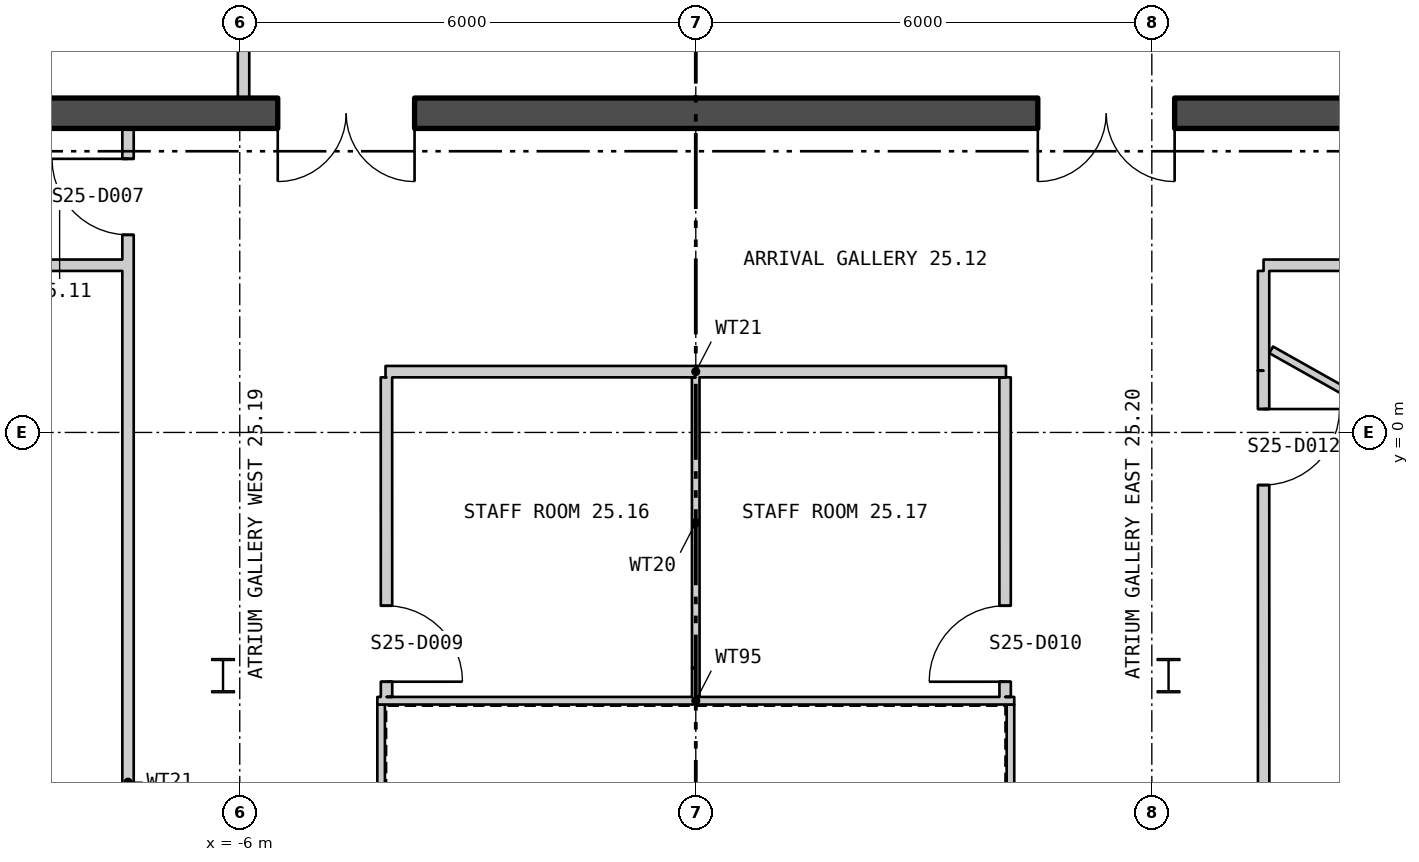
"""IFC4 building model, lengths in metres.
Left out: names, types, materials, properties, quantities, classifications, styles, units other than length and angle.
Written with IfcOpenShell. Run it as: python <this file> out.ifc"""

import sys

from ifc_helpers import new_model, si_unit, direction, frame, frame_2d, origin, origin_2d, place, context, subcontext, project, spatial, polyline, rectangle, i_section, outline, extrude, element, fill, save


model = new_model("IFC4")
c1 = context("Model", 3, precision=1e-05, world=origin(), true_north=direction((0.0, 1.0)))
c2 = subcontext(c1, "Body", "Model", "MODEL_VIEW")
j1 = project(units=[si_unit("LENGTHUNIT", "METRE"), si_unit("PLANEANGLEUNIT", "RADIAN")], contexts=[c1])
p1 = place(None, origin())
s1 = spatial("IfcSite", under=j1, at=p1, CompositionType="ELEMENT")
p2 = place(p1, origin())
s2 = spatial("IfcBuilding", under=s1, at=p2, CompositionType="ELEMENT")
p3 = place(p2, frame((0.0, 0.0, 321.0)))
s3 = spatial("IfcBuildingStorey", under=s2, at=p3, CompositionType="ELEMENT", Elevation=321.0)
for number, where, z_axis, x_axis in (
    (1, (6.22, -3.2, 0.0), (0.0, 0.0, 1.0), (1.0, 0.0, 0.0)),
    (2, (-6.22, -3.2, 0.0), (0.0, 0.0, 1.0), (1.0, 0.0, 0.0)),
):
    element("IfcColumn", number, at=place(p3, frame(where, z_axis=z_axis, x_axis=x_axis)), inside=s3, PredefinedType="COLUMN", context=c2, shape_type="SweptSolid", body=[
        extrude(i_section(OverallWidth=0.3, OverallDepth=0.45, WebThickness=0.014, FlangeThickness=0.026, at=origin_2d()), origin(), (0.0, 0.0, 1.0), 4.2),
    ])
p4 = place(p3, frame((-24.875, 16.493, -0.18), z_axis=(0.0, 0.0, 1.0), x_axis=(0.500000141277, -0.866025322218, 0.0)))
e3 = element("IfcWall", 3, at=p4, inside=s3, PredefinedType="SOLIDWALL", context=c2, shape_type="SweptSolid", body=[
    extrude(outline(polyline([(-0.13, -0.225), (45.86, -0.225), (45.6, 0.225), (0.13, 0.225), (-0.13, -0.225)])), origin(), (0.0, 0.0, 1.0), 3.98),
])
p5 = place(p4, frame((1.424, 0.0, 1.08)))
e4 = element("IfcOpeningElement", 4, at=p5, cuts=e3, PredefinedType="OPENING", context=c2, shape_type="SweptSolid", body=[
    extrude(rectangle(XDim=2.4, YDim=2.3, at=frame_2d((1.2, 1.15))), frame((0.0, 0.235, 0.0), z_axis=(0.0, -1.0, 0.0), x_axis=(1.0, 0.0, 0.0)), (0.0, 0.0, 1.0), 0.47),
])
p6 = place(p4, frame((5.892, 0.0, 1.08)))
e5 = element("IfcOpeningElement", 5, at=p6, cuts=e3, PredefinedType="OPENING", context=c2, shape_type="SweptSolid", body=[
    extrude(rectangle(XDim=2.4, YDim=2.3, at=frame_2d((1.2, 1.15))), frame((0.0, 0.235, 0.0), z_axis=(0.0, -1.0, 0.0), x_axis=(1.0, 0.0, 0.0)), (0.0, 0.0, 1.0), 0.47),
])
p7 = place(p4, frame((10.399, 0.0, 1.08)))
e6 = element("IfcOpeningElement", 6, at=p7, cuts=e3, PredefinedType="OPENING", context=c2, shape_type="SweptSolid", body=[
    extrude(rectangle(XDim=2.4, YDim=2.3, at=frame_2d((1.2, 1.15))), frame((0.0, 0.235, 0.0), z_axis=(0.0, -1.0, 0.0), x_axis=(1.0, 0.0, 0.0)), (0.0, 0.0, 1.0), 0.47),
])
p8 = place(p4, frame((14.905, 0.0, 1.08)))
e7 = element("IfcOpeningElement", 7, at=p8, cuts=e3, PredefinedType="OPENING", context=c2, shape_type="SweptSolid", body=[
    extrude(rectangle(XDim=2.4, YDim=2.3, at=frame_2d((1.2, 1.15))), frame((0.0, 0.235, 0.0), z_axis=(0.0, -1.0, 0.0), x_axis=(1.0, 0.0, 0.0)), (0.0, 0.0, 1.0), 0.47),
])
p9 = place(p4, frame((19.412, 0.0, 1.08)))
e8 = element("IfcOpeningElement", 8, at=p9, cuts=e3, PredefinedType="OPENING", context=c2, shape_type="SweptSolid", body=[
    extrude(rectangle(XDim=2.4, YDim=2.3, at=frame_2d((1.2, 1.15))), frame((0.0, 0.235, 0.0), z_axis=(0.0, -1.0, 0.0), x_axis=(1.0, 0.0, 0.0)), (0.0, 0.0, 1.0), 0.47),
])
p10 = place(p4, frame((23.918, 0.0, 1.08)))
e9 = element("IfcOpeningElement", 9, at=p10, cuts=e3, PredefinedType="OPENING", context=c2, shape_type="SweptSolid", body=[
    extrude(rectangle(XDim=2.4, YDim=2.3, at=frame_2d((1.2, 1.15))), frame((0.0, 0.235, 0.0), z_axis=(0.0, -1.0, 0.0), x_axis=(1.0, 0.0, 0.0)), (0.0, 0.0, 1.0), 0.47),
])
p11 = place(p4, frame((28.425, 0.0, 1.08)))
e10 = element("IfcOpeningElement", 10, at=p11, cuts=e3, PredefinedType="OPENING", context=c2, shape_type="SweptSolid", body=[
    extrude(rectangle(XDim=2.4, YDim=2.3, at=frame_2d((1.2, 1.15))), frame((0.0, 0.235, 0.0), z_axis=(0.0, -1.0, 0.0), x_axis=(1.0, 0.0, 0.0)), (0.0, 0.0, 1.0), 0.47),
])
p12 = place(p4, frame((37.438, 0.0, 1.08)))
e11 = element("IfcOpeningElement", 11, at=p12, cuts=e3, PredefinedType="OPENING", context=c2, shape_type="SweptSolid", body=[
    extrude(rectangle(XDim=2.4, YDim=2.3, at=frame_2d((1.2, 1.15))), frame((0.0, 0.235, 0.0), z_axis=(0.0, -1.0, 0.0), x_axis=(1.0, 0.0, 0.0)), (0.0, 0.0, 1.0), 0.47),
])
p13 = place(p4, frame((41.907, 0.0, 1.08)))
e12 = element("IfcOpeningElement", 12, at=p13, cuts=e3, PredefinedType="OPENING", context=c2, shape_type="SweptSolid", body=[
    extrude(rectangle(XDim=2.4, YDim=2.3, at=frame_2d((1.2, 1.15))), frame((0.0, 0.235, 0.0), z_axis=(0.0, -1.0, 0.0), x_axis=(1.0, 0.0, 0.0)), (0.0, 0.0, 1.0), 0.47),
])
p14 = place(p3, frame((2.01, -23.11, -0.18), z_axis=(0.0, 0.0, 1.0), x_axis=(0.500000141277, 0.866025322218, 0.0)))
e13 = element("IfcWall", 13, at=p14, inside=s3, PredefinedType="SOLIDWALL", context=c2, shape_type="SweptSolid", body=[
    extrude(outline(polyline([(-0.13, -0.225), (45.86, -0.225), (45.6, 0.225), (0.13, 0.225), (-0.13, -0.225)])), origin(), (0.0, 0.0, 1.0), 3.98),
])
p15 = place(p14, frame((1.424, 0.0, 1.08)))
e14 = element("IfcOpeningElement", 14, at=p15, cuts=e13, PredefinedType="OPENING", context=c2, shape_type="SweptSolid", body=[
    extrude(rectangle(XDim=2.4, YDim=2.3, at=frame_2d((1.2, 1.15))), frame((0.0, 0.235, 0.0), z_axis=(0.0, -1.0, 0.0), x_axis=(1.0, 0.0, 0.0)), (0.0, 0.0, 1.0), 0.47),
])
p16 = place(p14, frame((5.892, 0.0, 1.08)))
e15 = element("IfcOpeningElement", 15, at=p16, cuts=e13, PredefinedType="OPENING", context=c2, shape_type="SweptSolid", body=[
    extrude(rectangle(XDim=2.4, YDim=2.3, at=frame_2d((1.2, 1.15))), frame((0.0, 0.235, 0.0), z_axis=(0.0, -1.0, 0.0), x_axis=(1.0, 0.0, 0.0)), (0.0, 0.0, 1.0), 0.47),
])
p17 = place(p14, frame((14.905, 0.0, 1.08)))
e16 = element("IfcOpeningElement", 16, at=p17, cuts=e13, PredefinedType="OPENING", context=c2, shape_type="SweptSolid", body=[
    extrude(rectangle(XDim=2.4, YDim=2.3, at=frame_2d((1.2, 1.15))), frame((0.0, 0.235, 0.0), z_axis=(0.0, -1.0, 0.0), x_axis=(1.0, 0.0, 0.0)), (0.0, 0.0, 1.0), 0.47),
])
p18 = place(p14, frame((19.412, 0.0, 1.08)))
e17 = element("IfcOpeningElement", 17, at=p18, cuts=e13, PredefinedType="OPENING", context=c2, shape_type="SweptSolid", body=[
    extrude(rectangle(XDim=2.4, YDim=2.3, at=frame_2d((1.2, 1.15))), frame((0.0, 0.235, 0.0), z_axis=(0.0, -1.0, 0.0), x_axis=(1.0, 0.0, 0.0)), (0.0, 0.0, 1.0), 0.47),
])
p19 = place(p14, frame((23.918, 0.0, 1.08)))
e18 = element("IfcOpeningElement", 18, at=p19, cuts=e13, PredefinedType="OPENING", context=c2, shape_type="SweptSolid", body=[
    extrude(rectangle(XDim=2.4, YDim=2.3, at=frame_2d((1.2, 1.15))), frame((0.0, 0.235, 0.0), z_axis=(0.0, -1.0, 0.0), x_axis=(1.0, 0.0, 0.0)), (0.0, 0.0, 1.0), 0.47),
])
p20 = place(p14, frame((28.425, 0.0, 1.08)))
e19 = element("IfcOpeningElement", 19, at=p20, cuts=e13, PredefinedType="OPENING", context=c2, shape_type="SweptSolid", body=[
    extrude(rectangle(XDim=2.4, YDim=2.3, at=frame_2d((1.2, 1.15))), frame((0.0, 0.235, 0.0), z_axis=(0.0, -1.0, 0.0), x_axis=(1.0, 0.0, 0.0)), (0.0, 0.0, 1.0), 0.47),
])
p21 = place(p14, frame((37.438, 0.0, 1.08)))
e20 = element("IfcOpeningElement", 20, at=p21, cuts=e13, PredefinedType="OPENING", context=c2, shape_type="SweptSolid", body=[
    extrude(rectangle(XDim=2.4, YDim=2.3, at=frame_2d((1.2, 1.15))), frame((0.0, 0.235, 0.0), z_axis=(0.0, -1.0, 0.0), x_axis=(1.0, 0.0, 0.0)), (0.0, 0.0, 1.0), 0.47),
])
p22 = place(p14, frame((41.907, 0.0, 1.08)))
e21 = element("IfcOpeningElement", 21, at=p22, cuts=e13, PredefinedType="OPENING", context=c2, shape_type="SweptSolid", body=[
    extrude(rectangle(XDim=2.4, YDim=2.3, at=frame_2d((1.2, 1.15))), frame((0.0, 0.235, 0.0), z_axis=(0.0, -1.0, 0.0), x_axis=(1.0, 0.0, 0.0)), (0.0, 0.0, 1.0), 0.47),
])
p23 = place(p3, frame((4.14, -11.62, 0.0), z_axis=(0.0, 0.0, 1.0), x_axis=(0.0, 1.0, 0.0)))
e22 = element("IfcWall", 22, at=p23, inside=s3, PredefinedType="PARTITIONING", context=c2, shape_type="SweptSolid", body=[
    extrude(rectangle(XDim=8.04, YDim=0.1, at=frame_2d((4.02, 0.0))), origin(), (0.0, 0.0, 1.0), 4.0),
])
p24 = place(p3, frame((4.19, -3.53, 0.0), z_axis=(0.0, 0.0, 1.0), x_axis=(-1.0, 0.0, 0.0)))
e23 = element("IfcWall", 23, at=p24, inside=s3, PredefinedType="PARTITIONING", context=c2, shape_type="SweptSolid", body=[
    extrude(rectangle(XDim=8.38, YDim=0.1, at=frame_2d((4.19, 0.0))), origin(), (0.0, 0.0, 1.0), 4.0),
])
p25 = place(p3, frame((-4.14, -3.58, 0.0), z_axis=(0.0, 0.0, 1.0), x_axis=(0.0, -1.0, 0.0)))
e24 = element("IfcWall", 24, at=p25, inside=s3, PredefinedType="PARTITIONING", context=c2, shape_type="SweptSolid", body=[
    extrude(rectangle(XDim=8.04, YDim=0.1, at=frame_2d((4.02, 0.0))), origin(), (0.0, 0.0, 1.0), 4.0),
])
p26 = place(p3, frame((-14.5, 4.2, 0.0), z_axis=(0.0, 0.0, 1.0), x_axis=(1.0, 0.0, 0.0)))
e25 = element("IfcWall", 25, at=p26, inside=s3, PredefinedType="SHEAR", context=c2, shape_type="SweptSolid", body=[
    extrude(rectangle(XDim=29.0, YDim=0.4, at=frame_2d((14.5, 0.0))), origin(), (0.0, 0.0, 1.0), 4.0),
])
p27 = place(p26, frame((9.0, 0.0, 0.0)))
e26 = element("IfcOpeningElement", 26, at=p27, cuts=e25, PredefinedType="OPENING", context=c2, shape_type="SweptSolid", body=[
    extrude(rectangle(XDim=1.8, YDim=2.4, at=frame_2d((0.9, 1.2))), frame((0.0, 0.21, 0.0), z_axis=(0.0, -1.0, 0.0), x_axis=(1.0, 0.0, 0.0)), (0.0, 0.0, 1.0), 0.42),
])
p28 = place(p26, frame((19.0, 0.0, 0.0)))
e27 = element("IfcOpeningElement", 27, at=p28, cuts=e25, PredefinedType="OPENING", context=c2, shape_type="SweptSolid", body=[
    extrude(rectangle(XDim=1.8, YDim=2.4, at=frame_2d((0.9, 1.2))), frame((0.0, 0.21, 0.0), z_axis=(0.0, -1.0, 0.0), x_axis=(1.0, 0.0, 0.0)), (0.0, 0.0, 1.0), 0.42),
])
p29 = place(p3, frame((-5.95, 4.4, 0.0), z_axis=(0.0, 0.0, 1.0), x_axis=(0.0, 1.0, 0.0)))
e28 = element("IfcWall", 28, at=p29, inside=s3, PredefinedType="PARTITIONING", context=c2, shape_type="SweptSolid", body=[
    extrude(rectangle(XDim=1.895, YDim=0.15, at=frame_2d((0.948, 0.0))), origin(), (0.0, 0.0, 1.0), 4.0),
])
p30 = place(p3, frame((-16.225, 2.2, 0.0), z_axis=(0.0, 0.0, 1.0), x_axis=(1.0, 0.0, 0.0)))
e29 = element("IfcWall", 29, at=p30, inside=s3, PredefinedType="PARTITIONING", context=c2, shape_type="SweptSolid", body=[
    extrude(rectangle(XDim=8.68, YDim=0.15, at=frame_2d((4.34, 0.0))), origin(), (0.0, 0.0, 1.0), 4.0),
])
p31 = place(p30, frame((3.765, 0.0, 0.0)))
e30 = element("IfcOpeningElement", 30, at=p31, cuts=e29, PredefinedType="OPENING", context=c2, shape_type="SweptSolid", body=[
    extrude(rectangle(XDim=1.0, YDim=2.1, at=frame_2d((0.5, 1.05))), frame((0.0, 0.085, 0.0), z_axis=(0.0, -1.0, 0.0), x_axis=(1.0, 0.0, 0.0)), (0.0, 0.0, 1.0), 0.17),
])
p32 = place(p3, frame((-7.47, -13.203, 0.0), z_axis=(0.0, 0.0, 1.0), x_axis=(0.0, 1.0, 0.0)))
e31 = element("IfcWall", 31, at=p32, inside=s3, PredefinedType="PARTITIONING", context=c2, shape_type="SweptSolid", body=[
    extrude(rectangle(XDim=17.203, YDim=0.15, at=frame_2d((8.601, 0.0))), origin(), (0.0, 0.0, 1.0), 4.0),
])
p33 = place(p32, frame((3.519, 0.0, 0.0)))
e32 = element("IfcOpeningElement", 32, at=p33, cuts=e31, PredefinedType="OPENING", context=c2, shape_type="SweptSolid", body=[
    extrude(rectangle(XDim=1.0, YDim=2.1, at=frame_2d((0.5, 1.05))), frame((0.0, 0.085, 0.0), z_axis=(0.0, -1.0, 0.0), x_axis=(1.0, 0.0, 0.0)), (0.0, 0.0, 1.0), 0.17),
])
p34 = place(p32, frame((15.803, 0.0, 0.0)))
e33 = element("IfcOpeningElement", 33, at=p34, cuts=e31, PredefinedType="OPENING", context=c2, shape_type="SweptSolid", body=[
    extrude(rectangle(XDim=1.0, YDim=2.1, at=frame_2d((0.5, 1.05))), frame((0.0, 0.085, 0.0), z_axis=(0.0, -1.0, 0.0), x_axis=(1.0, 0.0, 0.0)), (0.0, 0.0, 1.0), 0.17),
])
p35 = place(p3, frame((-4.082, 0.8, 0.0), z_axis=(0.0, 0.0, 1.0), x_axis=(1.0, 0.0, 0.0)))
e34 = element("IfcWall", 34, at=p35, inside=s3, PredefinedType="PARTITIONING", context=c2, shape_type="SweptSolid", body=[
    extrude(rectangle(XDim=8.163, YDim=0.15, at=frame_2d((4.082, 0.0))), origin(), (0.0, 0.0, 1.0), 4.0),
])
p36 = place(p3, frame((-4.07, 0.725, 0.0), z_axis=(0.0, 0.0, 1.0), x_axis=(0.000237812122, -0.999999971723, 0.0)))
e35 = element("IfcWall", 35, at=p36, inside=s3, PredefinedType="PARTITIONING", context=c2, shape_type="SweptSolid", body=[
    extrude(rectangle(XDim=4.205, YDim=0.15, at=frame_2d((2.103, 0.0))), origin(), (0.0, 0.0, 1.0), 4.0),
])
p37 = place(p36, frame((3.005, 0.0, 0.0)))
e36 = element("IfcOpeningElement", 36, at=p37, cuts=e35, PredefinedType="OPENING", context=c2, shape_type="SweptSolid", body=[
    extrude(rectangle(XDim=1.0, YDim=2.1, at=frame_2d((0.5, 1.05))), frame((0.0, 0.085, 0.0), z_axis=(0.0, -1.0, 0.0), x_axis=(1.0, 0.0, 0.0)), (0.0, 0.0, 1.0), 0.17),
])
p38 = place(p3, frame((-0.001, 0.725, 0.0), z_axis=(0.0, 0.0, 1.0), x_axis=(0.000235294111, -0.999999972318, 0.0)))
e37 = element("IfcWall", 37, at=p38, inside=s3, PredefinedType="PARTITIONING", context=c2, shape_type="SweptSolid", body=[
    extrude(rectangle(XDim=3.825, YDim=0.1, at=frame_2d((1.913, 0.0))), origin(), (0.0, 0.0, 1.0), 3.55),
])
p39 = place(p3, frame((-0.0, -3.1, 0.0), z_axis=(0.0, 0.0, 1.0), x_axis=(0.000263157886, -0.999999965374, 0.0)))
e38 = element("IfcWall", 38, at=p39, inside=s3, PredefinedType="PARTITIONING", context=c2, shape_type="SweptSolid", body=[
    extrude(rectangle(XDim=0.38, YDim=0.1, at=frame_2d((0.19, 0.0))), origin(), (0.0, 0.0, 1.0), 4.0),
])
p40 = place(p3, frame((4.069, 0.725, 0.0), z_axis=(0.0, 0.0, 1.0), x_axis=(0.000237812122, -0.999999971723, 0.0)))
e39 = element("IfcWall", 39, at=p40, inside=s3, PredefinedType="PARTITIONING", context=c2, shape_type="SweptSolid", body=[
    extrude(rectangle(XDim=4.205, YDim=0.15, at=frame_2d((2.103, 0.0))), origin(), (0.0, 0.0, 1.0), 4.0),
])
p41 = place(p40, frame((3.005, 0.0, 0.0)))
e40 = element("IfcOpeningElement", 40, at=p41, cuts=e39, PredefinedType="OPENING", context=c2, shape_type="SweptSolid", body=[
    extrude(rectangle(XDim=1.0, YDim=2.1, at=frame_2d((0.5, 1.05))), frame((0.0, 0.085, 0.0), z_axis=(0.0, -1.0, 0.0), x_axis=(1.0, 0.0, 0.0)), (0.0, 0.0, 1.0), 0.17),
])
p42 = place(p3, frame((7.47, 0.812, 0.0), z_axis=(0.0, 0.0, 1.0), x_axis=(0.000170502981, -0.999999985464, 0.0)))
e41 = element("IfcWall", 41, at=p42, inside=s3, PredefinedType="PARTITIONING", context=c2, shape_type="SweptSolid", body=[
    extrude(rectangle(XDim=5.865, YDim=0.15, at=frame_2d((2.933, 0.0))), origin(), (0.0, 0.0, 1.0), 4.0),
])
p43 = place(p42, frame((0.504, 0.0, 0.0)))
e42 = element("IfcOpeningElement", 42, at=p43, cuts=e41, PredefinedType="OPENING", context=c2, shape_type="SweptSolid", body=[
    extrude(rectangle(XDim=1.0, YDim=2.1, at=frame_2d((0.5, 1.05))), frame((0.0, 0.085, 0.0), z_axis=(0.0, -1.0, 0.0), x_axis=(1.0, 0.0, 0.0)), (0.0, 0.0, 1.0), 0.17),
])
p44 = place(p3, frame((7.47, 0.812, 0.0), z_axis=(0.0, 0.0, 1.0), x_axis=(0.0, 1.0, 0.0)))
e43 = element("IfcWall", 43, at=p44, inside=s3, PredefinedType="PARTITIONING", context=c2, shape_type="SweptSolid", body=[
    extrude(rectangle(XDim=1.313, YDim=0.15, at=frame_2d((0.656, 0.0))), origin(), (0.0, 0.0, 1.0), 4.0),
])
p45 = place(p3, frame((7.47, 2.2, 0.0), z_axis=(0.0, 0.0, 1.0), x_axis=(1.0, 0.0, 0.0)))
e44 = element("IfcWall", 44, at=p45, inside=s3, PredefinedType="PARTITIONING", context=c2, shape_type="SweptSolid", body=[
    extrude(rectangle(XDim=8.755, YDim=0.15, at=frame_2d((4.378, 0.0))), origin(), (0.0, 0.0, 1.0), 4.0),
])
p46 = place(p45, frame((2.922, 0.0, 0.0)))
e45 = element("IfcOpeningElement", 45, at=p46, cuts=e44, PredefinedType="OPENING", context=c2, shape_type="SweptSolid", body=[
    extrude(rectangle(XDim=1.0, YDim=2.1, at=frame_2d((0.5, 1.05))), frame((0.0, 0.085, 0.0), z_axis=(0.0, -1.0, 0.0), x_axis=(1.0, 0.0, 0.0)), (0.0, 0.0, 1.0), 0.17),
])
p47 = place(p3, frame((7.57, 1.087, 0.0), z_axis=(0.0, 0.0, 1.0), x_axis=(0.871545267987, -0.490315047546, 0.0)))
e46 = element("IfcWall", 46, at=p47, inside=s3, PredefinedType="PARTITIONING", context=c2, shape_type="SweptSolid", body=[
    extrude(rectangle(XDim=7.059, YDim=0.1, at=frame_2d((3.529, 0.0))), origin(), (0.0, 0.0, 1.0), 4.0),
])
p48 = place(p27, origin())
e47 = element("IfcDoor", 47, at=p48, inside=s3, OperationType="DOUBLE_DOOR_SINGLE_SWING", PredefinedType="DOOR", context=c2, shape_type="SweptSolid", body=[
    extrude(rectangle(XDim=1.8, YDim=2.4, at=frame_2d((0.9, 1.2))), frame((0.0, 0.025, 0.0), z_axis=(0.0, -1.0, 0.0), x_axis=(1.0, 0.0, 0.0)), (0.0, 0.0, 1.0), 0.05),
])
fill(e26, e47)
p49 = place(p28, origin())
e48 = element("IfcDoor", 48, at=p49, inside=s3, OperationType="DOUBLE_DOOR_SINGLE_SWING", PredefinedType="DOOR", context=c2, shape_type="SweptSolid", body=[
    extrude(rectangle(XDim=1.8, YDim=2.4, at=frame_2d((0.9, 1.2))), frame((0.0, 0.025, 0.0), z_axis=(0.0, -1.0, 0.0), x_axis=(1.0, 0.0, 0.0)), (0.0, 0.0, 1.0), 0.05),
])
fill(e27, e48)
p50 = place(p34, origin())
e49 = element("IfcDoor", 49, at=p50, inside=s3, OperationType="SINGLE_SWING_LEFT", PredefinedType="DOOR", context=c2, shape_type="SweptSolid", body=[
    extrude(rectangle(XDim=1.0, YDim=2.1, at=frame_2d((0.5, 1.05))), frame((0.0, 0.025, 0.0), z_axis=(0.0, -1.0, 0.0), x_axis=(1.0, 0.0, 0.0)), (0.0, 0.0, 1.0), 0.05),
])
fill(e33, e49)
p51 = place(p37, origin())
e50 = element("IfcDoor", 50, at=p51, inside=s3, OperationType="SINGLE_SWING_LEFT", PredefinedType="DOOR", context=c2, shape_type="SweptSolid", body=[
    extrude(rectangle(XDim=1.0, YDim=2.1, at=frame_2d((0.5, 1.05))), frame((0.0, 0.025, 0.0), z_axis=(0.0, -1.0, 0.0), x_axis=(1.0, 0.0, 0.0)), (0.0, 0.0, 1.0), 0.05),
])
fill(e36, e50)
p52 = place(p41, origin())
e51 = element("IfcDoor", 51, at=p52, inside=s3, OperationType="SINGLE_SWING_RIGHT", PredefinedType="DOOR", context=c2, shape_type="SweptSolid", body=[
    extrude(rectangle(XDim=1.0, YDim=2.1, at=frame_2d((0.5, 1.05))), frame((0.0, 0.025, 0.0), z_axis=(0.0, -1.0, 0.0), x_axis=(1.0, 0.0, 0.0)), (0.0, 0.0, 1.0), 0.05),
])
fill(e40, e51)
p53 = place(p43, origin())
e52 = element("IfcDoor", 52, at=p53, inside=s3, OperationType="SINGLE_SWING_RIGHT", PredefinedType="DOOR", context=c2, shape_type="SweptSolid", body=[
    extrude(rectangle(XDim=1.0, YDim=2.1, at=frame_2d((0.5, 1.05))), frame((0.0, 0.025, 0.0), z_axis=(0.0, -1.0, 0.0), x_axis=(1.0, 0.0, 0.0)), (0.0, 0.0, 1.0), 0.05),
])
fill(e42, e52)
save(model, sys.argv[1])
